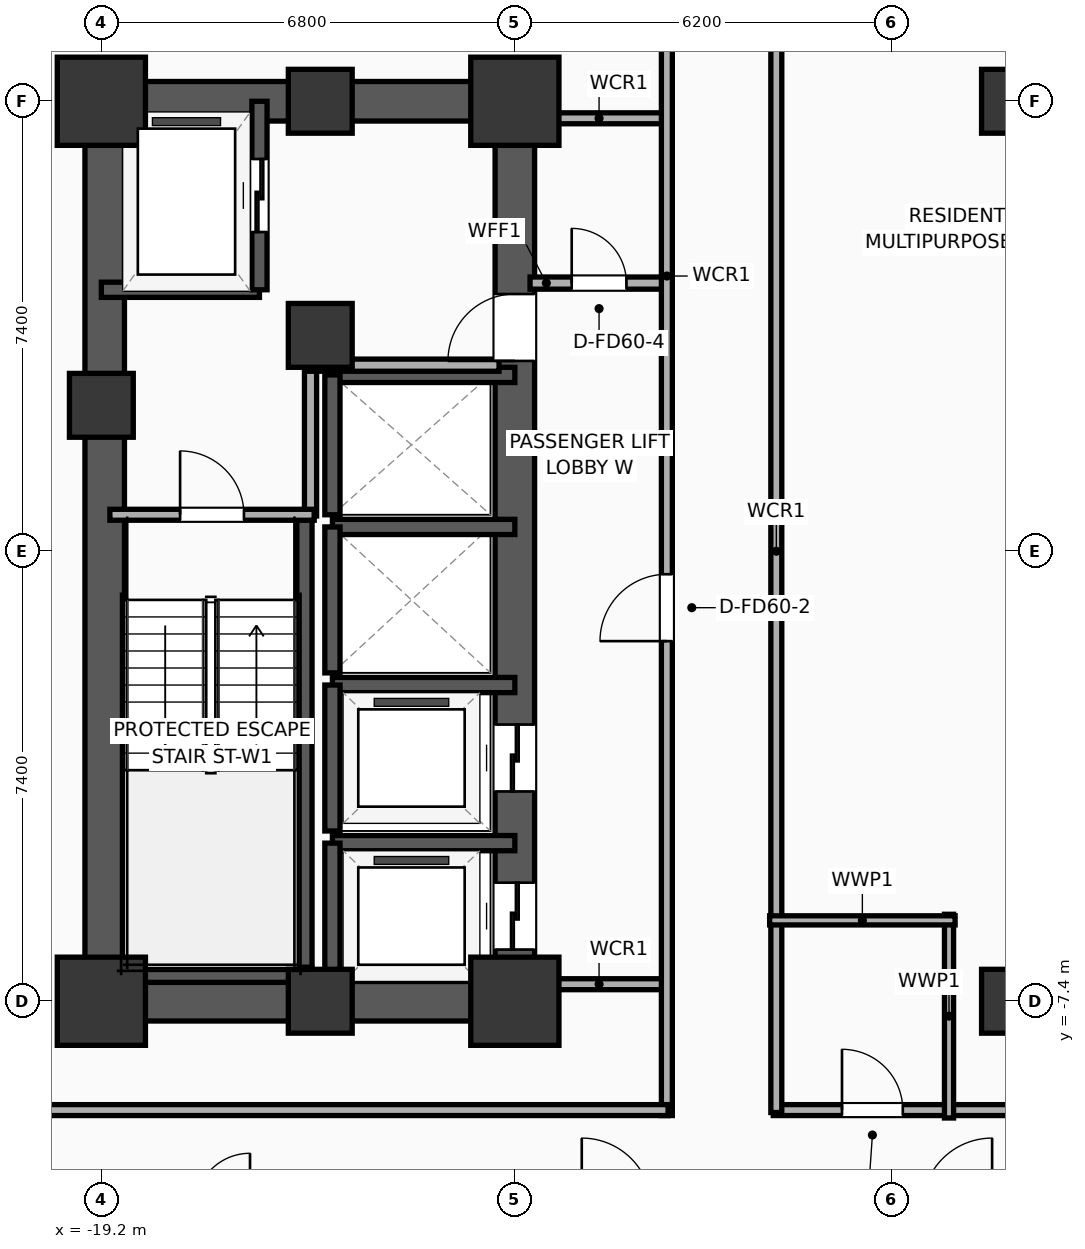
"""IFC4 building model, lengths in metres.
Left out: names, types, materials, properties, quantities, classifications, styles, units other than length and angle.
Written with IfcOpenShell. Run it as: python <this file> out.ifc"""

import sys

from ifc_helpers import new_model, si_unit, direction, frame, frame_2d, origin, origin_2d, place, context, subcontext, project, spatial, rectangle, extrude, element, fill, save


model = new_model("IFC4")
c1 = context("Model", 3, precision=1e-05, world=origin(), true_north=direction((0.0, 1.0)))
c2 = subcontext(c1, "Body", "Model", "MODEL_VIEW")
j1 = project(units=[si_unit("LENGTHUNIT", "METRE"), si_unit("PLANEANGLEUNIT", "RADIAN")], contexts=[c1])
p1 = place(None, origin())
s1 = spatial("IfcSite", under=j1, at=p1, CompositionType="ELEMENT")
p2 = place(p1, origin())
s2 = spatial("IfcBuilding", under=s1, at=p2, CompositionType="ELEMENT")
p3 = place(p2, frame((0.0, 0.0, 29.9)))
s3 = spatial("IfcBuildingStorey", under=s2, at=p3, CompositionType="ELEMENT", Elevation=29.9)
p4 = place(p3, frame((-19.2, -7.4, 0.0), z_axis=(0.0, 0.0, 1.0), x_axis=(1.0, 0.0, 0.0)))
e1 = element("IfcColumn", 1, at=p4, inside=s3, PredefinedType="COLUMN", context=c2, shape_type="SweptSolid", body=[
    extrude(rectangle(XDim=1.45, YDim=1.45, at=origin_2d()), origin(), (0.0, 0.0, 1.0), 3.9),
])
p5 = place(p3, frame((-19.2, 2.4, 0.0), z_axis=(0.0, 0.0, 1.0), x_axis=(1.0, 0.0, 0.0)))
e2 = element("IfcColumn", 2, at=p5, inside=s3, PredefinedType="COLUMN", context=c2, shape_type="SweptSolid", body=[
    extrude(rectangle(XDim=1.05, YDim=1.05, at=origin_2d()), origin(), (0.0, 0.0, 1.0), 3.9),
])
p6 = place(p3, frame((-19.2, 7.4, 0.0), z_axis=(0.0, 0.0, 1.0), x_axis=(1.0, 0.0, 0.0)))
e3 = element("IfcColumn", 3, at=p6, inside=s3, PredefinedType="COLUMN", context=c2, shape_type="SweptSolid", body=[
    extrude(rectangle(XDim=1.45, YDim=1.45, at=origin_2d()), origin(), (0.0, 0.0, 1.0), 3.9),
])
for number, where, z_axis, x_axis in (
    (4, (-15.6, -7.4, 0.0), (0.0, 0.0, 1.0), (1.0, 0.0, 0.0)),
    (5, (-15.6, 7.4, 0.0), (0.0, 0.0, 1.0), (1.0, 0.0, 0.0)),
):
    element("IfcColumn", number, at=place(p3, frame(where, z_axis=z_axis, x_axis=x_axis)), inside=s3, PredefinedType="COLUMN", context=c2, shape_type="SweptSolid", body=[
        extrude(rectangle(XDim=1.05, YDim=1.05, at=origin_2d()), origin(), (0.0, 0.0, 1.0), 3.9),
    ])
p7 = place(p3, frame((-12.4, -7.4, 0.0), z_axis=(0.0, 0.0, 1.0), x_axis=(1.0, 0.0, 0.0)))
e6 = element("IfcColumn", 6, at=p7, inside=s3, PredefinedType="COLUMN", context=c2, shape_type="SweptSolid", body=[
    extrude(rectangle(XDim=1.45, YDim=1.45, at=origin_2d()), origin(), (0.0, 0.0, 1.0), 3.9),
])
p8 = place(p3, frame((-15.6, 3.55, 0.0), z_axis=(0.0, 0.0, 1.0), x_axis=(1.0, 0.0, 0.0)))
e7 = element("IfcColumn", 7, at=p8, inside=s3, PredefinedType="COLUMN", context=c2, shape_type="SweptSolid", body=[
    extrude(rectangle(XDim=1.05, YDim=1.05, at=origin_2d()), origin(), (0.0, 0.0, 1.0), 3.9),
])
p9 = place(p3, frame((-12.4, 7.4, 0.0), z_axis=(0.0, 0.0, 1.0), x_axis=(1.0, 0.0, 0.0)))
e8 = element("IfcColumn", 8, at=p9, inside=s3, PredefinedType="COLUMN", context=c2, shape_type="SweptSolid", body=[
    extrude(rectangle(XDim=1.45, YDim=1.45, at=origin_2d()), origin(), (0.0, 0.0, 1.0), 3.9),
])
for number, where, z_axis, x_axis in (
    (9, (-19.525, -7.4, 0.0), (0.0, 0.0, 1.0), (1.0, 0.0, 0.0)),
    (10, (-19.525, 7.4, 0.0), (0.0, 0.0, 1.0), (1.0, 0.0, 0.0)),
):
    element("IfcWall", number, at=place(p3, frame(where, z_axis=z_axis, x_axis=x_axis)), inside=s3, PredefinedType="SHEAR", context=c2, shape_type="SweptSolid", body=[
        extrude(rectangle(XDim=7.45, YDim=0.65, at=frame_2d((3.725, 0.0))), origin(), (0.0, 0.0, 1.0), 3.65),
    ])
p10 = place(p3, frame((-19.145, -7.4, 0.0), z_axis=(0.0, 0.0, 1.0), x_axis=(0.0, 1.0, 0.0)))
e11 = element("IfcWall", 11, at=p10, inside=s3, PredefinedType="SHEAR", context=c2, shape_type="SweptSolid", body=[
    extrude(rectangle(XDim=14.8, YDim=0.65, at=frame_2d((7.4, 0.0))), origin(), (0.0, 0.0, 1.0), 3.65),
])
p11 = place(p3, frame((-12.4, -7.4, 0.0), z_axis=(0.0, 0.0, 1.0), x_axis=(0.0, 1.0, 0.0)))
e12 = element("IfcWall", 12, at=p11, inside=s3, PredefinedType="SHEAR", context=c2, shape_type="SweptSolid", body=[
    extrude(rectangle(XDim=14.8, YDim=0.65, at=frame_2d((7.4, 0.0))), origin(), (0.0, 0.0, 1.0), 3.65),
])
p12 = place(p11, frame((0.85, 0.0, 0.0)))
e13 = element("IfcOpeningElement", 13, at=p12, cuts=e12, PredefinedType="OPENING", context=c2, shape_type="SweptSolid", body=[
    extrude(rectangle(XDim=1.1, YDim=2.05, at=frame_2d((0.55, 1.025))), frame((0.0, 0.335, 0.0), z_axis=(0.0, -1.0, 0.0), x_axis=(1.0, 0.0, 0.0)), (0.0, 0.0, 1.0), 0.67),
])
p13 = place(p11, frame((3.45, 0.0, 0.0)))
e14 = element("IfcOpeningElement", 14, at=p13, cuts=e12, PredefinedType="OPENING", context=c2, shape_type="SweptSolid", body=[
    extrude(rectangle(XDim=1.1, YDim=2.05, at=frame_2d((0.55, 1.025))), frame((0.0, 0.335, 0.0), z_axis=(0.0, -1.0, 0.0), x_axis=(1.0, 0.0, 0.0)), (0.0, 0.0, 1.0), 0.67),
])
p14 = place(p11, frame((10.53, 0.0, 0.0)))
e15 = element("IfcOpeningElement", 15, at=p14, cuts=e12, PredefinedType="OPENING", context=c2, shape_type="SweptSolid", body=[
    extrude(rectangle(XDim=1.1, YDim=2.05, at=frame_2d((0.55, 1.025))), frame((0.0, 0.335, 0.0), z_axis=(0.0, -1.0, 0.0), x_axis=(1.0, 0.0, 0.0)), (0.0, 0.0, 1.0), 0.67),
])
p15 = place(p3, frame((-15.86, -7.085, 0.0), z_axis=(0.0, 0.0, 1.0), x_axis=(0.0, 1.0, 0.0)))
e16 = element("IfcWall", 16, at=p15, inside=s3, PredefinedType="SOLIDWALL", context=c2, shape_type="SweptSolid", body=[
    extrude(rectangle(XDim=7.685, YDim=0.25, at=frame_2d((3.843, 0.0))), origin(), (0.0, 0.0, 1.0), 3.65),
])
p16 = place(p3, frame((-19.2, -6.965, 0.0), z_axis=(0.0, 0.0, 1.0), x_axis=(1.0, 0.0, 0.0)))
e17 = element("IfcWall", 17, at=p16, inside=s3, PredefinedType="SOLIDWALL", context=c2, shape_type="SweptSolid", body=[
    extrude(rectangle(XDim=3.46, YDim=0.25, at=frame_2d((1.73, 0.0))), origin(), (0.0, 0.0, 1.0), 3.65),
])
for number, where, z_axis, x_axis in (
    (18, (-4.2, -7.4, 0.0), (0.0, 0.0, 1.0), (1.0, 0.0, 0.0)),
    (19, (-4.2, 7.4, 0.0), (0.0, 0.0, 1.0), (1.0, 0.0, 0.0)),
):
    element("IfcColumn", number, at=place(p3, frame(where, z_axis=z_axis, x_axis=x_axis)), inside=s3, PredefinedType="COLUMN", context=c2, shape_type="SweptSolid", body=[
        extrude(rectangle(XDim=1.05, YDim=1.05, at=origin_2d()), origin(), (0.0, 0.0, 1.0), 3.9),
    ])
p17 = place(p3, frame((-19.2, 4.3, 0.0), z_axis=(0.0, 0.0, 1.0), x_axis=(1.0, 0.0, 0.0)))
e20 = element("IfcWall", 20, at=p17, inside=s3, PredefinedType="SOLIDWALL", context=c2, shape_type="SweptSolid", body=[
    extrude(rectangle(XDim=2.6, YDim=0.25, at=frame_2d((1.3, 0.0))), origin(), (0.0, 0.0, 1.0), 3.65),
])
p18 = place(p3, frame((-16.6, 4.3, 0.0), z_axis=(0.0, 0.0, 1.0), x_axis=(0.0, 1.0, 0.0)))
e21 = element("IfcWall", 21, at=p18, inside=s3, PredefinedType="SOLIDWALL", context=c2, shape_type="SweptSolid", body=[
    extrude(rectangle(XDim=3.1, YDim=0.25, at=frame_2d((1.55, 0.0))), origin(), (0.0, 0.0, 1.0), 3.65),
])
p19 = place(p18, frame((0.95, 0.0, 0.0)))
e22 = element("IfcOpeningElement", 22, at=p19, cuts=e21, PredefinedType="OPENING", context=c2, shape_type="SweptSolid", body=[
    extrude(rectangle(XDim=1.2, YDim=2.05, at=frame_2d((0.6, 1.025))), frame((0.0, 0.135, 0.0), z_axis=(0.0, -1.0, 0.0), x_axis=(1.0, 0.0, 0.0)), (0.0, 0.0, 1.0), 0.27),
])
p20 = place(p3, frame((-12.4, -4.8, 0.0), z_axis=(0.0, 0.0, 1.0), x_axis=(-1.0, 0.0, 0.0)))
e23 = element("IfcWall", 23, at=p20, inside=s3, PredefinedType="SOLIDWALL", context=c2, shape_type="SweptSolid", body=[
    extrude(rectangle(XDim=3.0, YDim=0.25, at=frame_2d((1.5, 0.0))), origin(), (0.0, 0.0, 1.0), 3.65),
])
p21 = place(p3, frame((-15.4, -4.8, 0.0), z_axis=(0.0, 0.0, 1.0), x_axis=(0.0, -1.0, 0.0)))
e24 = element("IfcWall", 24, at=p21, inside=s3, PredefinedType="SOLIDWALL", context=c2, shape_type="SweptSolid", body=[
    extrude(rectangle(XDim=2.6, YDim=0.25, at=frame_2d((1.3, 0.0))), origin(), (0.0, 0.0, 1.0), 3.65),
])
p22 = place(p3, frame((-12.4, -2.2, 0.0), z_axis=(0.0, 0.0, 1.0), x_axis=(-1.0, 0.0, 0.0)))
e25 = element("IfcWall", 25, at=p22, inside=s3, PredefinedType="SOLIDWALL", context=c2, shape_type="SweptSolid", body=[
    extrude(rectangle(XDim=3.0, YDim=0.25, at=frame_2d((1.5, 0.0))), origin(), (0.0, 0.0, 1.0), 3.65),
])
p23 = place(p3, frame((-15.4, -2.2, 0.0), z_axis=(0.0, 0.0, 1.0), x_axis=(0.0, -1.0, 0.0)))
e26 = element("IfcWall", 26, at=p23, inside=s3, PredefinedType="SOLIDWALL", context=c2, shape_type="SweptSolid", body=[
    extrude(rectangle(XDim=2.4, YDim=0.25, at=frame_2d((1.2, 0.0))), origin(), (0.0, 0.0, 1.0), 3.65),
])
p24 = place(p3, frame((-12.4, 0.4, 0.0), z_axis=(0.0, 0.0, 1.0), x_axis=(-1.0, 0.0, 0.0)))
e27 = element("IfcWall", 27, at=p24, inside=s3, PredefinedType="SOLIDWALL", context=c2, shape_type="SweptSolid", body=[
    extrude(rectangle(XDim=3.0, YDim=0.25, at=frame_2d((1.5, 0.0))), origin(), (0.0, 0.0, 1.0), 3.65),
])
p25 = place(p3, frame((-15.4, 0.4, 0.0), z_axis=(0.0, 0.0, 1.0), x_axis=(0.0, -1.0, 0.0)))
e28 = element("IfcWall", 28, at=p25, inside=s3, PredefinedType="SOLIDWALL", context=c2, shape_type="SweptSolid", body=[
    extrude(rectangle(XDim=2.4, YDim=0.25, at=frame_2d((1.2, 0.0))), origin(), (0.0, 0.0, 1.0), 3.65),
])
p26 = place(p3, frame((-12.4, 2.9, 0.0), z_axis=(0.0, 0.0, 1.0), x_axis=(-1.0, 0.0, 0.0)))
e29 = element("IfcWall", 29, at=p26, inside=s3, PredefinedType="SOLIDWALL", context=c2, shape_type="SweptSolid", body=[
    extrude(rectangle(XDim=3.0, YDim=0.25, at=frame_2d((1.5, 0.0))), origin(), (0.0, 0.0, 1.0), 3.65),
])
p27 = place(p3, frame((-15.4, 2.9, 0.0), z_axis=(0.0, 0.0, 1.0), x_axis=(0.0, -1.0, 0.0)))
e30 = element("IfcWall", 30, at=p27, inside=s3, PredefinedType="SOLIDWALL", context=c2, shape_type="SweptSolid", body=[
    extrude(rectangle(XDim=2.3, YDim=0.25, at=frame_2d((1.15, 0.0))), origin(), (0.0, 0.0, 1.0), 3.65),
])
p28 = place(p3, frame((-15.76, 0.58, 0.0), z_axis=(0.0, 0.0, 1.0), x_axis=(0.0, 1.0, 0.0)))
e31 = element("IfcWall", 31, at=p28, inside=s3, PredefinedType="PARTITIONING", context=c2, shape_type="SweptSolid", body=[
    extrude(rectangle(XDim=2.52, YDim=0.2, at=frame_2d((1.26, 0.0))), origin(), (0.0, 0.0, 1.0), 3.65),
])
p29 = place(p3, frame((-15.82, 3.06, 0.0), z_axis=(0.0, 0.0, 1.0), x_axis=(1.0, 0.0, 0.0)))
e32 = element("IfcWall", 32, at=p29, inside=s3, PredefinedType="PARTITIONING", context=c2, shape_type="SweptSolid", body=[
    extrude(rectangle(XDim=3.16, YDim=0.2, at=frame_2d((1.58, 0.0))), origin(), (0.0, 0.0, 1.0), 3.65),
])
p30 = place(p3, frame((-19.06, 0.6, 0.0), z_axis=(0.0, 0.0, 1.0), x_axis=(1.0, 0.0, 0.0)))
e33 = element("IfcWall", 33, at=p30, inside=s3, PredefinedType="PARTITIONING", context=c2, shape_type="SweptSolid", body=[
    extrude(rectangle(XDim=3.36, YDim=0.18, at=frame_2d((1.68, 0.0))), origin(), (0.0, 0.0, 1.0), 3.65),
])
p31 = place(p30, frame((1.155, 0.0, 0.0)))
e34 = element("IfcOpeningElement", 34, at=p31, cuts=e33, PredefinedType="OPENING", context=c2, shape_type="SweptSolid", body=[
    extrude(rectangle(XDim=1.05, YDim=2.05, at=frame_2d((0.525, 1.025))), frame((0.0, 0.1, 0.0), z_axis=(0.0, -1.0, 0.0), x_axis=(1.0, 0.0, 0.0)), (0.0, 0.0, 1.0), 0.2),
])
p32 = place(p3, frame((-12.15, 4.41, 0.0), z_axis=(0.0, 0.0, 1.0), x_axis=(1.0, 0.0, 0.0)))
e35 = element("IfcWall", 35, at=p32, inside=s3, PredefinedType="PARTITIONING", context=c2, shape_type="SweptSolid", body=[
    extrude(rectangle(XDim=2.27, YDim=0.2, at=frame_2d((1.135, 0.0))), origin(), (0.0, 0.0, 1.0), 3.65),
])
p33 = place(p32, frame((0.685, 0.0, 0.0)))
e36 = element("IfcOpeningElement", 36, at=p33, cuts=e35, PredefinedType="OPENING", context=c2, shape_type="SweptSolid", body=[
    extrude(rectangle(XDim=0.9, YDim=2.05, at=frame_2d((0.45, 1.025))), frame((0.0, 0.11, 0.0), z_axis=(0.0, -1.0, 0.0), x_axis=(1.0, 0.0, 0.0)), (0.0, 0.0, 1.0), 0.22),
])
for number, where, z_axis, x_axis in (
    (37, (-12.15, 7.12, 0.0), (0.0, 0.0, 1.0), (1.0, 0.0, 0.0)),
    (38, (-12.15, -7.12, 0.0), (0.0, 0.0, 1.0), (1.0, 0.0, 0.0)),
):
    element("IfcWall", number, at=place(p3, frame(where, z_axis=z_axis, x_axis=x_axis)), inside=s3, PredefinedType="PARTITIONING", context=c2, shape_type="SweptSolid", body=[
        extrude(rectangle(XDim=2.27, YDim=0.18, at=frame_2d((1.135, 0.0))), origin(), (0.0, 0.0, 1.0), 2.94),
    ])
p34 = place(p3, frame((-9.9, -9.28, 0.0), z_axis=(0.0, 0.0, 1.0), x_axis=(0.0, 1.0, 0.0)))
e39 = element("IfcWall", 39, at=p34, inside=s3, PredefinedType="PARTITIONING", context=c2, shape_type="SweptSolid", body=[
    extrude(rectangle(XDim=18.56, YDim=0.18, at=frame_2d((9.28, 0.0))), origin(), (0.0, 0.0, 1.0), 3.65),
])
p35 = place(p34, frame((7.802, 0.0, 0.0)))
e40 = element("IfcOpeningElement", 40, at=p35, cuts=e39, PredefinedType="OPENING", context=c2, shape_type="SweptSolid", body=[
    extrude(rectangle(XDim=1.1, YDim=2.05, at=frame_2d((0.55, 1.025))), frame((0.0, 0.1, 0.0), z_axis=(0.0, -1.0, 0.0), x_axis=(1.0, 0.0, 0.0)), (0.0, 0.0, 1.0), 0.2),
])
p36 = place(p3, frame((-33.41, -9.19, 0.0), z_axis=(0.0, 0.0, 1.0), x_axis=(1.0, 0.0, 0.0)))
e41 = element("IfcWall", 41, at=p36, inside=s3, PredefinedType="PARTITIONING", context=c2, shape_type="SweptSolid", body=[
    extrude(rectangle(XDim=23.53, YDim=0.18, at=frame_2d((11.765, 0.0))), origin(), (0.0, 0.0, 1.0), 3.65),
])
p37 = place(p3, frame((-8.15, -9.19, 0.0), z_axis=(0.0, 0.0, 1.0), x_axis=(1.0, 0.0, 0.0)))
e42 = element("IfcWall", 42, at=p37, inside=s3, PredefinedType="PARTITIONING", context=c2, shape_type="SweptSolid", body=[
    extrude(rectangle(XDim=16.3, YDim=0.18, at=frame_2d((8.15, 0.0))), origin(), (0.0, 0.0, 1.0), 3.65),
])
p38 = place(p37, frame((1.13, 0.0, 0.0)))
e43 = element("IfcOpeningElement", 43, at=p38, cuts=e42, PredefinedType="OPENING", context=c2, shape_type="SweptSolid", body=[
    extrude(rectangle(XDim=1.0, YDim=2.05, at=frame_2d((0.5, 1.025))), frame((0.0, 0.1, 0.0), z_axis=(0.0, -1.0, 0.0), x_axis=(1.0, 0.0, 0.0)), (0.0, 0.0, 1.0), 0.2),
])
p39 = place(p37, frame((10.12, 0.0, 0.0)))
e44 = element("IfcOpeningElement", 44, at=p39, cuts=e42, PredefinedType="OPENING", context=c2, shape_type="SweptSolid", body=[
    extrude(rectangle(XDim=0.95, YDim=2.05, at=frame_2d((0.475, 1.025))), frame((0.0, 0.1, 0.0), z_axis=(0.0, -1.0, 0.0), x_axis=(1.0, 0.0, 0.0)), (0.0, 0.0, 1.0), 0.2),
])
p40 = place(p3, frame((-8.1, -9.23, 0.0), z_axis=(0.0, 0.0, 1.0), x_axis=(0.0, 1.0, 0.0)))
e45 = element("IfcWall", 45, at=p40, inside=s3, PredefinedType="PARTITIONING", context=c2, shape_type="SweptSolid", body=[
    extrude(rectangle(XDim=18.46, YDim=0.18, at=frame_2d((9.23, 0.0))), origin(), (0.0, 0.0, 1.0), 3.65),
])
p41 = place(p3, frame((-5.26, -9.32, 0.0), z_axis=(0.0, 0.0, 1.0), x_axis=(0.0, 1.0, 0.0)))
e46 = element("IfcWall", 46, at=p41, inside=s3, PredefinedType="PLUMBINGWALL", context=c2, shape_type="SweptSolid", body=[
    extrude(rectangle(XDim=3.35, YDim=0.15, at=frame_2d((1.675, 0.0))), origin(), (0.0, 0.0, 1.0), 3.65),
])
p42 = place(p3, frame((-8.21, -6.07, 0.0), z_axis=(0.0, 0.0, 1.0), x_axis=(1.0, 0.0, 0.0)))
e47 = element("IfcWall", 47, at=p42, inside=s3, PredefinedType="PLUMBINGWALL", context=c2, shape_type="SweptSolid", body=[
    extrude(rectangle(XDim=3.05, YDim=0.15, at=frame_2d((1.525, 0.0))), origin(), (0.0, 0.0, 1.0), 3.65),
])
p43 = place(p19, origin())
e48 = element("IfcDoor", 48, at=p43, inside=s3, OperationType="SLIDING_TO_LEFT", PredefinedType="DOOR", context=c2, shape_type="SweptSolid", body=[
    extrude(rectangle(XDim=1.2, YDim=2.05, at=frame_2d((0.6, 1.025))), frame((0.0, 0.025, 0.0), z_axis=(0.0, -1.0, 0.0), x_axis=(1.0, 0.0, 0.0)), (0.0, 0.0, 1.0), 0.05),
])
fill(e22, e48)
p44 = place(p12, origin())
e49 = element("IfcDoor", 49, at=p44, inside=s3, OperationType="SLIDING_TO_LEFT", PredefinedType="DOOR", context=c2, shape_type="SweptSolid", body=[
    extrude(rectangle(XDim=1.1, YDim=2.05, at=frame_2d((0.55, 1.025))), frame((0.0, 0.025, 0.0), z_axis=(0.0, -1.0, 0.0), x_axis=(1.0, 0.0, 0.0)), (0.0, 0.0, 1.0), 0.05),
])
fill(e13, e49)
p45 = place(p13, origin())
e50 = element("IfcDoor", 50, at=p45, inside=s3, OperationType="SLIDING_TO_LEFT", PredefinedType="DOOR", context=c2, shape_type="SweptSolid", body=[
    extrude(rectangle(XDim=1.1, YDim=2.05, at=frame_2d((0.55, 1.025))), frame((0.0, 0.025, 0.0), z_axis=(0.0, -1.0, 0.0), x_axis=(1.0, 0.0, 0.0)), (0.0, 0.0, 1.0), 0.05),
])
fill(e14, e50)
p46 = place(p31, origin())
e51 = element("IfcDoor", 51, at=p46, inside=s3, OperationType="SINGLE_SWING_LEFT", PredefinedType="DOOR", context=c2, shape_type="SweptSolid", body=[
    extrude(rectangle(XDim=1.05, YDim=2.05, at=frame_2d((0.525, 1.025))), frame((0.0, 0.025, 0.0), z_axis=(0.0, -1.0, 0.0), x_axis=(1.0, 0.0, 0.0)), (0.0, 0.0, 1.0), 0.05),
])
fill(e34, e51)
p47 = place(p33, origin())
e52 = element("IfcDoor", 52, at=p47, inside=s3, OperationType="SINGLE_SWING_LEFT", PredefinedType="DOOR", context=c2, shape_type="SweptSolid", body=[
    extrude(rectangle(XDim=0.9, YDim=2.05, at=frame_2d((0.45, 1.025))), frame((0.0, 0.025, 0.0), z_axis=(0.0, -1.0, 0.0), x_axis=(1.0, 0.0, 0.0)), (0.0, 0.0, 1.0), 0.05),
])
fill(e36, e52)
p48 = place(p35, origin())
e53 = element("IfcDoor", 53, at=p48, inside=s3, OperationType="SINGLE_SWING_LEFT", PredefinedType="DOOR", context=c2, shape_type="SweptSolid", body=[
    extrude(rectangle(XDim=1.1, YDim=2.05, at=frame_2d((0.55, 1.025))), frame((0.0, 0.025, 0.0), z_axis=(0.0, -1.0, 0.0), x_axis=(1.0, 0.0, 0.0)), (0.0, 0.0, 1.0), 0.05),
])
fill(e40, e53)
p49 = place(p38, origin())
e54 = element("IfcDoor", 54, at=p49, inside=s3, OperationType="SINGLE_SWING_LEFT", PredefinedType="DOOR", context=c2, shape_type="SweptSolid", body=[
    extrude(rectangle(XDim=1.0, YDim=2.05, at=frame_2d((0.5, 1.025))), frame((0.0, 0.025, 0.0), z_axis=(0.0, -1.0, 0.0), x_axis=(1.0, 0.0, 0.0)), (0.0, 0.0, 1.0), 0.05),
])
fill(e43, e54)
p50 = place(p14, origin())
e55 = element("IfcDoor", 55, at=p50, inside=s3, OperationType="SINGLE_SWING_LEFT", PredefinedType="DOOR", context=c2, shape_type="SweptSolid", body=[
    extrude(rectangle(XDim=1.1, YDim=2.05, at=frame_2d((0.55, 1.025))), frame((0.0, 0.025, 0.0), z_axis=(0.0, -1.0, 0.0), x_axis=(1.0, 0.0, 0.0)), (0.0, 0.0, 1.0), 0.05),
])
fill(e15, e55)
save(model, sys.argv[1])
